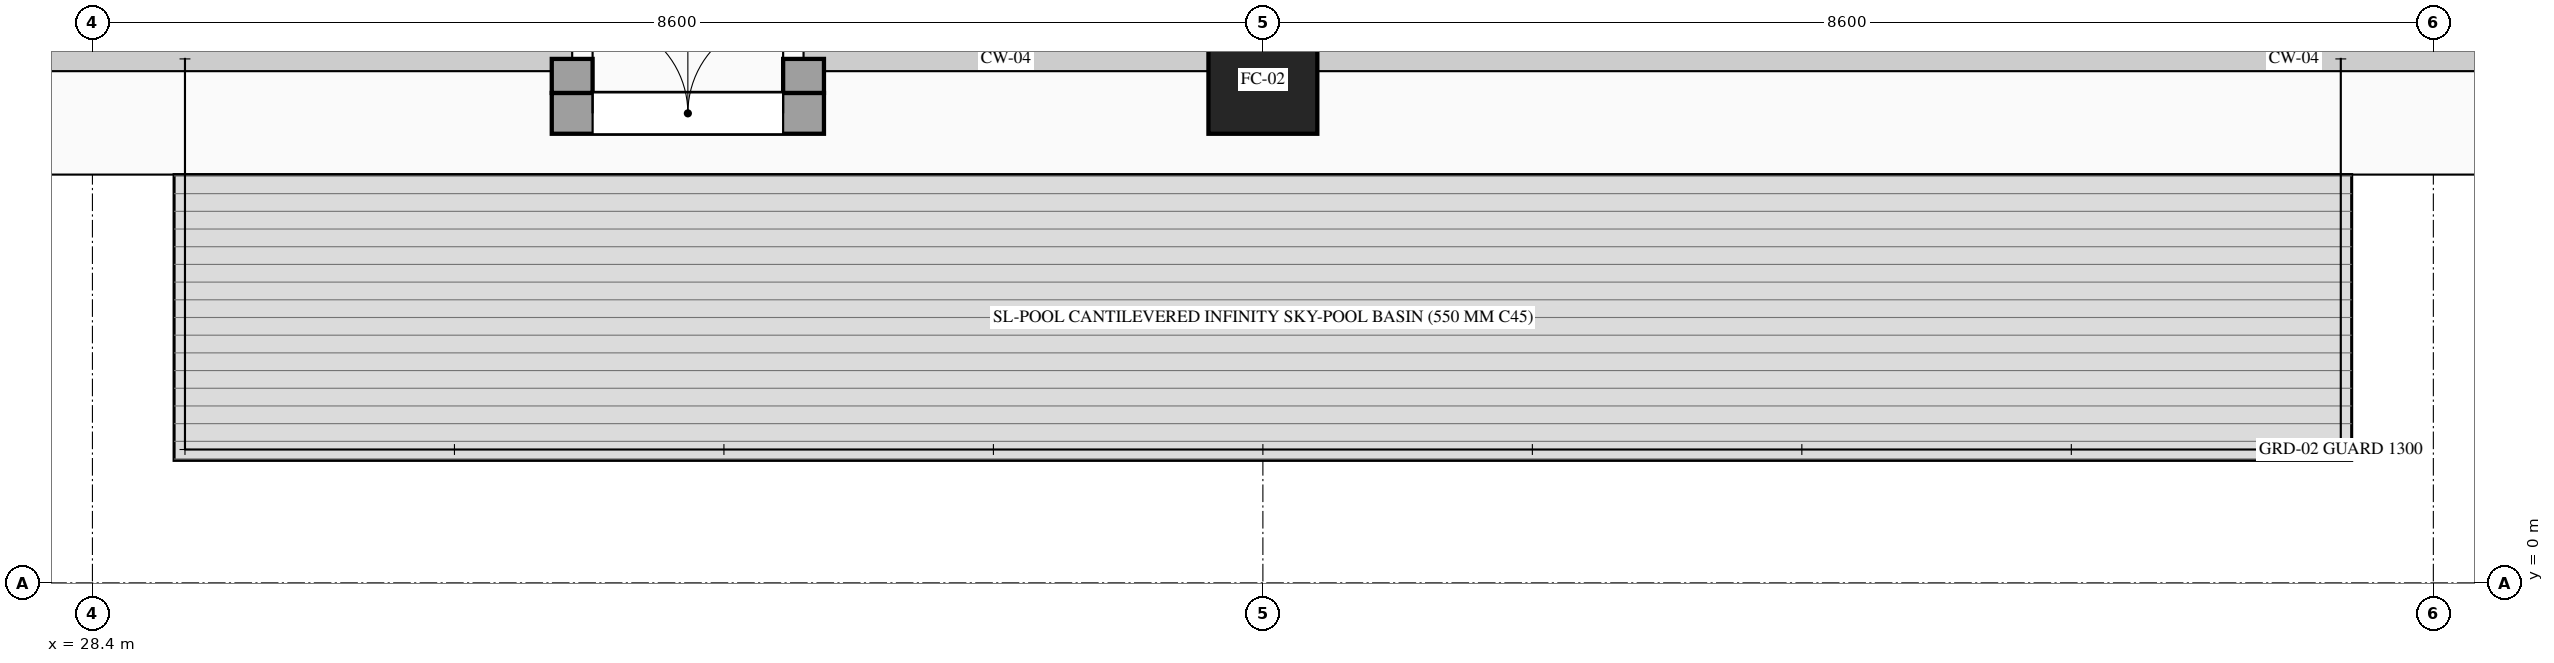
"""IFC4 building model, lengths in metres.
Left out: names, types, materials, properties, quantities, classifications, styles, units other than length and angle.
Written with IfcOpenShell. Run it as: python <this file> out.ifc"""

import sys

from ifc_helpers import new_model, si_unit, direction, frame, frame_2d, origin, origin_2d, place, context, subcontext, project, spatial, rectangle, hollow_rectangle, extrude, source, transform, mapped, element, fill, save


model = new_model("IFC4")
c1 = context("Model", 3, precision=1e-05, world=origin(), true_north=direction((0.0, 1.0)))
c2 = subcontext(c1, "Body", "Model", "MODEL_VIEW")
j1 = project(units=[si_unit("LENGTHUNIT", "METRE"), si_unit("PLANEANGLEUNIT", "RADIAN")], contexts=[c1])
p1 = place(None, origin())
s1 = spatial("IfcSite", under=j1, at=p1, CompositionType="ELEMENT")
p2 = place(p1, origin())
s2 = spatial("IfcBuilding", under=s1, at=p2, CompositionType="ELEMENT")
p3 = place(p2, frame((0.0, 0.0, 166.8)))
s3 = spatial("IfcBuildingStorey", under=s2, at=p3, CompositionType="ELEMENT", Elevation=166.8)
m1 = source(origin(), c2, "Body", "SweptSolid", [
    extrude(hollow_rectangle(XDim=0.8, YDim=0.8, WallThickness=0.036, at=origin_2d()), origin(), (0.0, 0.0, 1.0), 5.35),
])
p4 = place(p3, frame((37.0, 3.7, -0.55), z_axis=(0.0, 0.0, 1.0), x_axis=(1.0, 0.0, 0.0)))
e1 = element("IfcColumn", 1, at=p4, inside=s3, PredefinedType="COLUMN", context=c2, shape_type="MappedRepresentation", body=[
    mapped(m1, transform((0.0, 0.0, 0.0), scale=1.0)),
])
p5 = place(p3, frame((31.775, 3.45, 0.0), z_axis=(0.0, 0.0, 1.0), x_axis=(1.0, 0.0, 0.0)))
e2 = element("IfcWall", 2, at=p5, inside=s3, PredefinedType="SOLIDWALL", context=c2, shape_type="SweptSolid", body=[
    extrude(rectangle(XDim=2.0, YDim=0.3, at=frame_2d((1.0, 0.0))), origin(), (0.0, 0.0, 1.0), 4.055),
])
p6 = place(p5, frame((0.3, 0.0, 0.0)))
e3 = element("IfcOpeningElement", 3, at=p6, cuts=e2, PredefinedType="OPENING", context=c2, shape_type="SweptSolid", body=[
    extrude(rectangle(XDim=1.4, YDim=2.3, at=frame_2d((0.7, 1.15))), frame((0.0, 0.165, 0.0), z_axis=(0.0, -1.0, 0.0), x_axis=(1.0, 0.0, 0.0)), (0.0, 0.0, 1.0), 0.33),
])
m2 = source(origin(), c2, "Body", "SweptSolid", [
    extrude(rectangle(XDim=0.25, YDim=0.3, at=frame_2d((0.125, 0.0))), origin(), (0.0, 0.0, 1.0), 4.5),
])
for number, where, z_axis, x_axis in (
    (4, (31.925, 3.85, 0.0), (0.0, 0.0, 1.0), (0.0, -1.0, 0.0)),
    (5, (33.625, 3.6, 0.0), (0.0, 0.0, 1.0), (0.0, 1.0, 0.0)),
):
    element("IfcWall", number, at=place(p3, frame(where, z_axis=z_axis, x_axis=x_axis)), inside=s3, PredefinedType="SOLIDWALL", context=c2, shape_type="MappedRepresentation", body=[
        mapped(m2, transform((0.0, 0.0, 0.0), scale=1.0)),
    ])
m3 = source(origin(), c2, "Body", "SweptSolid", [
    extrude(rectangle(XDim=13.54, YDim=0.16, at=frame_2d((6.77, 0.0))), origin(), (0.0, 0.0, 1.0), 3.907),
])
p7 = place(p3, frame((36.9, 3.85, 0.0), z_axis=(0.0, 0.0, 1.0), x_axis=(0.0, 1.0, 0.0)))
e6 = element("IfcWall", 6, at=p7, inside=s3, PredefinedType="PARTITIONING", context=c2, shape_type="MappedRepresentation", body=[
    mapped(m3, transform((0.0, 0.0, 0.0), scale=1.0)),
])
m4 = source(origin(), c2, "Body", "SweptSolid", [
    extrude(rectangle(XDim=1.4, YDim=2.3, at=frame_2d((0.7, 1.15))), frame((0.0, 0.025, 0.0), z_axis=(0.0, -1.0, 0.0), x_axis=(1.0, 0.0, 0.0)), (0.0, 0.0, 1.0), 0.05),
])
p8 = place(p6, origin())
e7 = element("IfcDoor", 7, at=p8, inside=s3, OperationType="DOUBLE_DOOR_SINGLE_SWING", PredefinedType="DOOR", context=c2, shape_type="MappedRepresentation", body=[
    mapped(m4, transform((0.0, 0.0, 0.0), scale=1.0)),
])
fill(e3, e7)
save(model, sys.argv[1])
